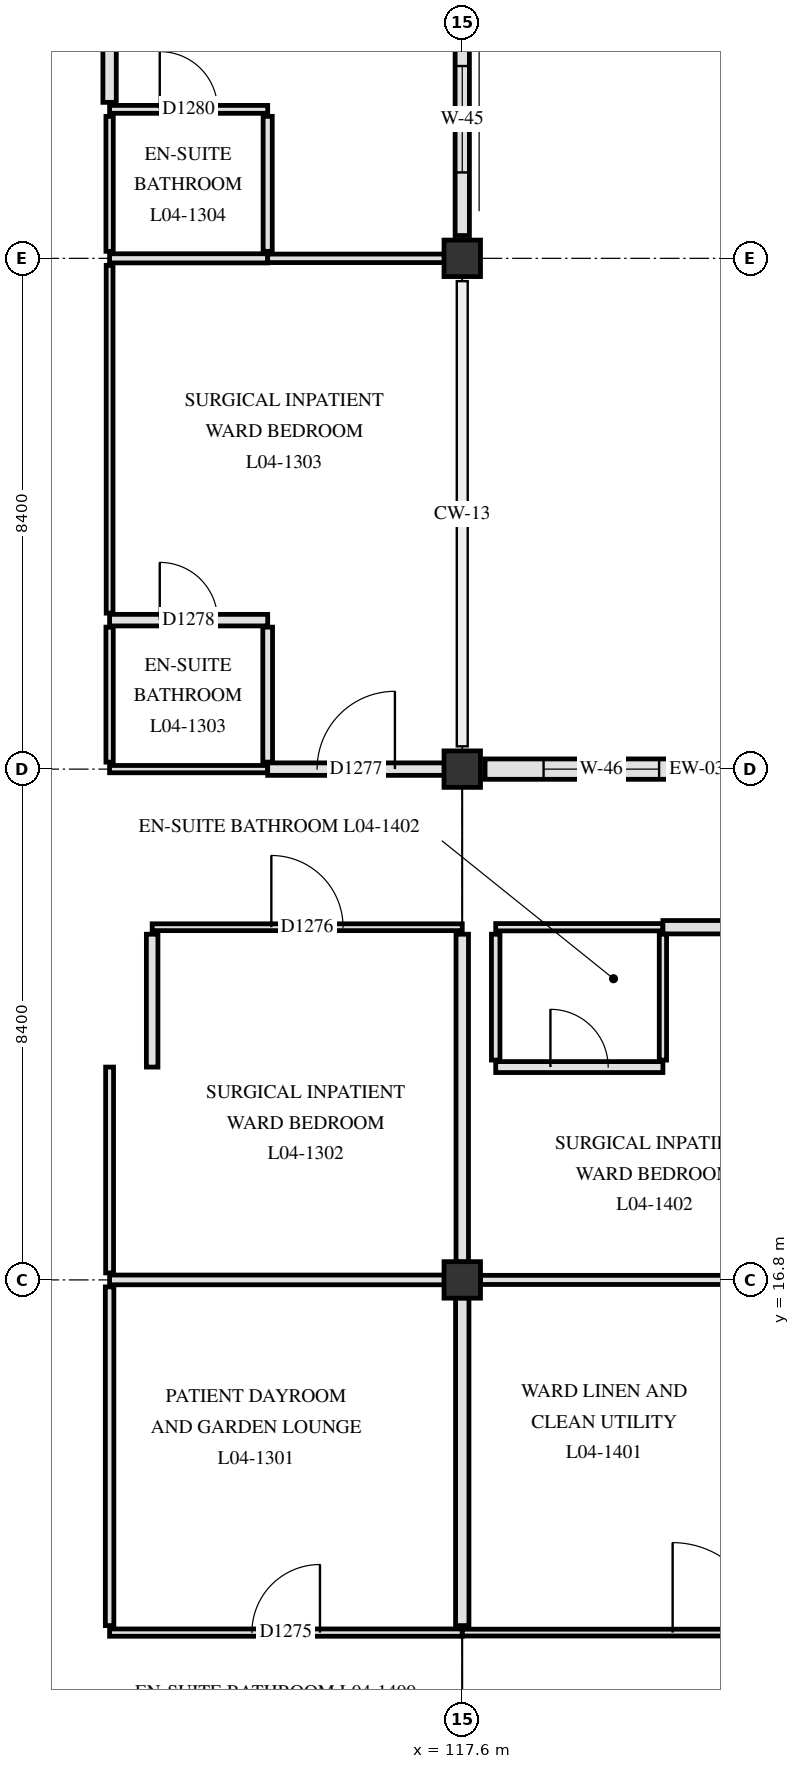
"""IFC4 building model, lengths in metres.
Left out: names, types, materials, properties, quantities, classifications, styles, units other than length and angle.
Written with IfcOpenShell. Run it as: python <this file> out.ifc"""

import sys

from ifc_helpers import new_model, si_unit, direction, frame, frame_2d, origin, origin_2d, place, context, subcontext, project, spatial, rectangle, extrude, element, fill, save


model = new_model("IFC4")
c1 = context("Model", 3, precision=1e-05, world=origin(), true_north=direction((0.0, 1.0)))
c2 = subcontext(c1, "Body", "Model", "MODEL_VIEW")
j1 = project(units=[si_unit("LENGTHUNIT", "METRE"), si_unit("PLANEANGLEUNIT", "RADIAN")], contexts=[c1])
p1 = place(None, origin())
s1 = spatial("IfcSite", under=j1, at=p1, CompositionType="ELEMENT")
p2 = place(p1, origin())
s2 = spatial("IfcBuilding", under=s1, at=p2, CompositionType="ELEMENT")
p3 = place(p2, frame((0.0, 0.0, 18.6)))
s3 = spatial("IfcBuildingStorey", under=s2, at=p3, CompositionType="ELEMENT", Elevation=18.6)
for number, where, z_axis, x_axis in (
    (1, (117.6, 16.8, 0.0), (0.0, 0.0, 1.0), (1.0, 0.0, 0.0)),
    (2, (117.6, 25.2, 0.0), (0.0, 0.0, 1.0), (1.0, 0.0, 0.0)),
    (3, (117.6, 33.6, 0.0), (0.0, 0.0, 1.0), (1.0, 0.0, 0.0)),
):
    element("IfcColumn", number, at=place(p3, frame(where, z_axis=z_axis, x_axis=x_axis)), inside=s3, PredefinedType="COLUMN", context=c2, shape_type="SweptSolid", body=[
        extrude(rectangle(XDim=0.6, YDim=0.6, at=origin_2d()), origin(), (0.0, 0.0, 1.0), 3.9),
    ])
p4 = place(p3, frame((117.6, 41.625, 0.0), z_axis=(0.0, 0.0, 1.0), x_axis=(0.0, -1.0, 0.0)))
e4 = element("IfcWall", 4, at=p4, inside=s3, PredefinedType="SOLIDWALL", context=c2, shape_type="SweptSolid", body=[
    extrude(rectangle(XDim=7.65, YDim=0.235, at=frame_2d((3.825, 0.0))), origin(), (0.0, 0.0, 1.0), 3.38),
])
p5 = place(p4, frame((1.113, 0.0, 0.85)))
e5 = element("IfcOpeningElement", 5, at=p5, cuts=e4, PredefinedType="OPENING", context=c2, shape_type="SweptSolid", body=[
    extrude(rectangle(XDim=1.6, YDim=1.78, at=frame_2d((0.8, 0.89))), frame((0.0, 0.127, 0.0), z_axis=(0.0, -1.0, 0.0), x_axis=(1.0, 0.0, 0.0)), (0.0, 0.0, 1.0), 0.255),
])
p6 = place(p4, frame((4.863, 0.0, 0.85)))
e6 = element("IfcOpeningElement", 6, at=p6, cuts=e4, PredefinedType="OPENING", context=c2, shape_type="SweptSolid", body=[
    extrude(rectangle(XDim=1.75, YDim=1.78, at=frame_2d((0.875, 0.89))), frame((0.0, 0.127, 0.0), z_axis=(0.0, -1.0, 0.0), x_axis=(1.0, 0.0, 0.0)), (0.0, 0.0, 1.0), 0.255),
])
p7 = place(p3, frame((117.975, 25.2, 0.0), z_axis=(0.0, 0.0, 1.0), x_axis=(1.0, 0.0, 0.0)))
e7 = element("IfcWall", 7, at=p7, inside=s3, PredefinedType="SOLIDWALL", context=c2, shape_type="SweptSolid", body=[
    extrude(rectangle(XDim=7.65, YDim=0.335, at=frame_2d((3.825, 0.0))), origin(), (0.0, 0.0, 1.0), 3.31),
])
p8 = place(p7, frame((0.962, 0.0, 0.85)))
e8 = element("IfcOpeningElement", 8, at=p8, cuts=e7, PredefinedType="OPENING", context=c2, shape_type="SweptSolid", body=[
    extrude(rectangle(XDim=1.9, YDim=1.78, at=frame_2d((0.95, 0.89))), frame((0.0, 0.177, 0.0), z_axis=(0.0, -1.0, 0.0), x_axis=(1.0, 0.0, 0.0)), (0.0, 0.0, 1.0), 0.355),
])
p9 = place(p7, frame((5.262, 0.0, 0.85)))
e9 = element("IfcOpeningElement", 9, at=p9, cuts=e7, PredefinedType="OPENING", context=c2, shape_type="SweptSolid", body=[
    extrude(rectangle(XDim=0.95, YDim=1.3, at=frame_2d((0.475, 0.65))), frame((0.0, 0.177, 0.0), z_axis=(0.0, -1.0, 0.0), x_axis=(1.0, 0.0, 0.0)), (0.0, 0.0, 1.0), 0.355),
])
p10 = place(p3, frame((111.8, 11.0, 0.0), z_axis=(0.0, 0.0, 1.0), x_axis=(1.0, 0.0, 0.0)))
e10 = element("IfcWall", 10, at=p10, inside=s3, PredefinedType="PARTITIONING", context=c2, shape_type="SweptSolid", body=[
    extrude(rectangle(XDim=5.8, YDim=0.12, at=frame_2d((2.9, 0.0))), origin(), (0.0, 0.0, 1.0), 3.26),
])
p11 = place(p10, frame((2.34, 0.0, 0.0)))
e11 = element("IfcOpeningElement", 11, at=p11, cuts=e10, PredefinedType="OPENING", context=c2, shape_type="SweptSolid", body=[
    extrude(rectangle(XDim=1.12, YDim=2.18, at=frame_2d((0.56, 1.09))), frame((0.0, 0.07, 0.0), z_axis=(0.0, -1.0, 0.0), x_axis=(1.0, 0.0, 0.0)), (0.0, 0.0, 1.0), 0.14),
])
p12 = place(p3, frame((117.6, 11.0, 0.0), z_axis=(0.0, 0.0, 1.0), x_axis=(1.0, 0.0, 0.0)))
e12 = element("IfcWall", 12, at=p12, inside=s3, PredefinedType="PARTITIONING", context=c2, shape_type="SweptSolid", body=[
    extrude(rectangle(XDim=8.4, YDim=0.112, at=frame_2d((4.2, 0.0))), origin(), (0.0, 0.0, 1.0), 3.26),
])
p13 = place(p12, frame((3.46, 0.0, 0.0)))
e13 = element("IfcOpeningElement", 13, at=p13, cuts=e12, PredefinedType="OPENING", context=c2, shape_type="SweptSolid", body=[
    extrude(rectangle(XDim=1.48, YDim=2.22, at=frame_2d((0.74, 1.11))), frame((0.0, 0.066, 0.0), z_axis=(0.0, -1.0, 0.0), x_axis=(1.0, 0.0, 0.0)), (0.0, 0.0, 1.0), 0.132),
])
p14 = place(p3, frame((111.8, 16.8, 0.0), z_axis=(0.0, 0.0, 1.0), x_axis=(1.0, 0.0, 0.0)))
e14 = element("IfcWall", 14, at=p14, inside=s3, PredefinedType="PARTITIONING", context=c2, shape_type="SweptSolid", body=[
    extrude(rectangle(XDim=5.505, YDim=0.16, at=frame_2d((2.752, 0.0))), origin(), (0.0, 0.0, 1.0), 3.16),
])
p15 = place(p3, frame((117.895, 16.8, 0.0), z_axis=(0.0, 0.0, 1.0), x_axis=(1.0, 0.0, 0.0)))
e15 = element("IfcWall", 15, at=p15, inside=s3, PredefinedType="PARTITIONING", context=c2, shape_type="SweptSolid", body=[
    extrude(rectangle(XDim=7.81, YDim=0.15, at=frame_2d((3.905, 0.0))), origin(), (0.0, 0.0, 1.0), 3.16),
])
p16 = place(p3, frame((118.15, 20.3, 0.0), z_axis=(0.0, 0.0, 1.0), x_axis=(1.0, 0.0, 0.0)))
e16 = element("IfcWall", 16, at=p16, inside=s3, PredefinedType="PARTITIONING", context=c2, shape_type="SweptSolid", body=[
    extrude(rectangle(XDim=2.75, YDim=0.18, at=frame_2d((1.375, 0.0))), origin(), (0.0, 0.0, 1.0), 3.61),
])
p17 = place(p16, frame((0.9, 0.0, 0.0)))
e17 = element("IfcOpeningElement", 17, at=p17, cuts=e16, PredefinedType="OPENING", context=c2, shape_type="SweptSolid", body=[
    extrude(rectangle(XDim=0.95, YDim=2.1, at=frame_2d((0.475, 1.05))), frame((0.0, 0.1, 0.0), z_axis=(0.0, -1.0, 0.0), x_axis=(1.0, 0.0, 0.0)), (0.0, 0.0, 1.0), 0.2),
])
p18 = place(p3, frame((112.5, 22.6, 0.0), z_axis=(0.0, 0.0, 1.0), x_axis=(1.0, 0.0, 0.0)))
e18 = element("IfcWall", 18, at=p18, inside=s3, PredefinedType="PARTITIONING", context=c2, shape_type="SweptSolid", body=[
    extrude(rectangle(XDim=5.1, YDim=0.112, at=frame_2d((2.55, 0.0))), origin(), (0.0, 0.0, 1.0), 3.26),
])
p19 = place(p18, frame((1.96, 0.0, 0.0)))
e19 = element("IfcOpeningElement", 19, at=p19, cuts=e18, PredefinedType="OPENING", context=c2, shape_type="SweptSolid", body=[
    extrude(rectangle(XDim=1.18, YDim=2.18, at=frame_2d((0.59, 1.09))), frame((0.0, 0.066, 0.0), z_axis=(0.0, -1.0, 0.0), x_axis=(1.0, 0.0, 0.0)), (0.0, 0.0, 1.0), 0.132),
])
p20 = place(p3, frame((118.15, 22.6, 0.0), z_axis=(0.0, 0.0, 1.0), x_axis=(1.0, 0.0, 0.0)))
e20 = element("IfcWall", 20, at=p20, inside=s3, PredefinedType="PARTITIONING", context=c2, shape_type="SweptSolid", body=[
    extrude(rectangle(XDim=2.75, YDim=0.12, at=frame_2d((1.375, 0.0))), origin(), (0.0, 0.0, 1.0), 3.61),
])
p21 = place(p3, frame((120.9, 22.6, 0.0), z_axis=(0.0, 0.0, 1.0), x_axis=(1.0, 0.0, 0.0)))
e21 = element("IfcWall", 21, at=p21, inside=s3, PredefinedType="PARTITIONING", context=c2, shape_type="SweptSolid", body=[
    extrude(rectangle(XDim=5.1, YDim=0.22, at=frame_2d((2.55, 0.0))), origin(), (0.0, 0.0, 1.0), 3.26),
])
p22 = place(p21, frame((1.78, 0.0, 0.0)))
e22 = element("IfcOpeningElement", 22, at=p22, cuts=e21, PredefinedType="OPENING", context=c2, shape_type="SweptSolid", body=[
    extrude(rectangle(XDim=1.54, YDim=2.24, at=frame_2d((0.77, 1.12))), frame((0.0, 0.12, 0.0), z_axis=(0.0, -1.0, 0.0), x_axis=(1.0, 0.0, 0.0)), (0.0, 0.0, 1.0), 0.24),
])
p23 = place(p3, frame((111.8, 25.2, 0.0), z_axis=(0.0, 0.0, 1.0), x_axis=(1.0, 0.0, 0.0)))
e23 = element("IfcWall", 23, at=p23, inside=s3, PredefinedType="PARTITIONING", context=c2, shape_type="SweptSolid", body=[
    extrude(rectangle(XDim=2.6, YDim=0.12, at=frame_2d((1.3, 0.0))), origin(), (0.0, 0.0, 1.0), 3.16),
])
p24 = place(p3, frame((114.4, 25.2, 0.0), z_axis=(0.0, 0.0, 1.0), x_axis=(1.0, 0.0, 0.0)))
e24 = element("IfcWall", 24, at=p24, inside=s3, PredefinedType="PARTITIONING", context=c2, shape_type="SweptSolid", body=[
    extrude(rectangle(XDim=2.905, YDim=0.205, at=frame_2d((1.453, 0.0))), origin(), (0.0, 0.0, 1.0), 3.16),
])
p25 = place(p24, frame((0.812, 0.0, 0.0)))
e25 = element("IfcOpeningElement", 25, at=p25, cuts=e24, PredefinedType="OPENING", context=c2, shape_type="SweptSolid", body=[
    extrude(rectangle(XDim=1.28, YDim=2.18, at=frame_2d((0.64, 1.09))), frame((0.0, 0.113, 0.0), z_axis=(0.0, -1.0, 0.0), x_axis=(1.0, 0.0, 0.0)), (0.0, 0.0, 1.0), 0.225),
])
p26 = place(p3, frame((111.8, 27.65, 0.0), z_axis=(0.0, 0.0, 1.0), x_axis=(1.0, 0.0, 0.0)))
e26 = element("IfcWall", 26, at=p26, inside=s3, PredefinedType="PARTITIONING", context=c2, shape_type="SweptSolid", body=[
    extrude(rectangle(XDim=2.6, YDim=0.19, at=frame_2d((1.3, 0.0))), origin(), (0.0, 0.0, 1.0), 3.61),
])
p27 = place(p26, frame((0.825, 0.0, 0.0)))
e27 = element("IfcOpeningElement", 27, at=p27, cuts=e26, PredefinedType="OPENING", context=c2, shape_type="SweptSolid", body=[
    extrude(rectangle(XDim=0.95, YDim=2.1, at=frame_2d((0.475, 1.05))), frame((0.0, 0.105, 0.0), z_axis=(0.0, -1.0, 0.0), x_axis=(1.0, 0.0, 0.0)), (0.0, 0.0, 1.0), 0.21),
])
p28 = place(p3, frame((111.8, 33.6, 0.0), z_axis=(0.0, 0.0, 1.0), x_axis=(1.0, 0.0, 0.0)))
e28 = element("IfcWall", 28, at=p28, inside=s3, PredefinedType="PARTITIONING", context=c2, shape_type="SweptSolid", body=[
    extrude(rectangle(XDim=2.6, YDim=0.15, at=frame_2d((1.3, 0.0))), origin(), (0.0, 0.0, 1.0), 3.16),
])
p29 = place(p3, frame((114.4, 33.6, 0.0), z_axis=(0.0, 0.0, 1.0), x_axis=(1.0, 0.0, 0.0)))
e29 = element("IfcWall", 29, at=p29, inside=s3, PredefinedType="PARTITIONING", context=c2, shape_type="SweptSolid", body=[
    extrude(rectangle(XDim=2.905, YDim=0.14, at=frame_2d((1.453, 0.0))), origin(), (0.0, 0.0, 1.0), 3.16),
])
p30 = place(p3, frame((111.8, 36.05, 0.0), z_axis=(0.0, 0.0, 1.0), x_axis=(1.0, 0.0, 0.0)))
e30 = element("IfcWall", 30, at=p30, inside=s3, PredefinedType="PARTITIONING", context=c2, shape_type="SweptSolid", body=[
    extrude(rectangle(XDim=2.6, YDim=0.13, at=frame_2d((1.3, 0.0))), origin(), (0.0, 0.0, 1.0), 3.61),
])
p31 = place(p30, frame((0.825, 0.0, 0.0)))
e31 = element("IfcOpeningElement", 31, at=p31, cuts=e30, PredefinedType="OPENING", context=c2, shape_type="SweptSolid", body=[
    extrude(rectangle(XDim=0.95, YDim=2.1, at=frame_2d((0.475, 1.05))), frame((0.0, 0.075, 0.0), z_axis=(0.0, -1.0, 0.0), x_axis=(1.0, 0.0, 0.0)), (0.0, 0.0, 1.0), 0.15),
])
p32 = place(p3, frame((111.8, 11.115, 0.0), z_axis=(0.0, 0.0, 1.0), x_axis=(0.0, 1.0, 0.0)))
e32 = element("IfcWall", 32, at=p32, inside=s3, PredefinedType="PARTITIONING", context=c2, shape_type="SweptSolid", body=[
    extrude(rectangle(XDim=5.57, YDim=0.14, at=frame_2d((2.785, 0.0))), origin(), (0.0, 0.0, 1.0), 3.31),
])
p33 = place(p3, frame((111.8, 16.915, 0.0), z_axis=(0.0, 0.0, 1.0), x_axis=(0.0, 1.0, 0.0)))
e33 = element("IfcWall", 33, at=p33, inside=s3, PredefinedType="PARTITIONING", context=c2, shape_type="SweptSolid", body=[
    extrude(rectangle(XDim=3.385, YDim=0.13, at=frame_2d((1.692, 0.0))), origin(), (0.0, 0.0, 1.0), 3.31),
])
p34 = place(p3, frame((111.8, 25.315, 0.0), z_axis=(0.0, 0.0, 1.0), x_axis=(0.0, 1.0, 0.0)))
e34 = element("IfcWall", 34, at=p34, inside=s3, PredefinedType="PARTITIONING", context=c2, shape_type="SweptSolid", body=[
    extrude(rectangle(XDim=2.22, YDim=0.12, at=frame_2d((1.11, 0.0))), origin(), (0.0, 0.0, 1.0), 3.61),
])
p35 = place(p3, frame((111.8, 27.765, 0.0), z_axis=(0.0, 0.0, 1.0), x_axis=(0.0, 1.0, 0.0)))
e35 = element("IfcWall", 35, at=p35, inside=s3, PredefinedType="PARTITIONING", context=c2, shape_type="SweptSolid", body=[
    extrude(rectangle(XDim=5.72, YDim=0.112, at=frame_2d((2.86, 0.0))), origin(), (0.0, 0.0, 1.0), 3.31),
])
p36 = place(p3, frame((111.8, 33.715, 0.0), z_axis=(0.0, 0.0, 1.0), x_axis=(0.0, 1.0, 0.0)))
e36 = element("IfcWall", 36, at=p36, inside=s3, PredefinedType="PARTITIONING", context=c2, shape_type="SweptSolid", body=[
    extrude(rectangle(XDim=2.22, YDim=0.12, at=frame_2d((1.11, 0.0))), origin(), (0.0, 0.0, 1.0), 3.61),
])
p37 = place(p3, frame((111.8, 36.165, 0.0), z_axis=(0.0, 0.0, 1.0), x_axis=(0.0, 1.0, 0.0)))
e37 = element("IfcWall", 37, at=p37, inside=s3, PredefinedType="PARTITIONING", context=c2, shape_type="SweptSolid", body=[
    extrude(rectangle(XDim=5.72, YDim=0.22, at=frame_2d((2.86, 0.0))), origin(), (0.0, 0.0, 1.0), 3.31),
])
p38 = place(p3, frame((112.5, 20.3, 0.0), z_axis=(0.0, 0.0, 1.0), x_axis=(0.0, 1.0, 0.0)))
e38 = element("IfcWall", 38, at=p38, inside=s3, PredefinedType="PARTITIONING", context=c2, shape_type="SweptSolid", body=[
    extrude(rectangle(XDim=2.185, YDim=0.19, at=frame_2d((1.093, 0.0))), origin(), (0.0, 0.0, 1.0), 3.31),
])
p39 = place(p3, frame((114.4, 25.315, 0.0), z_axis=(0.0, 0.0, 1.0), x_axis=(0.0, 1.0, 0.0)))
e39 = element("IfcWall", 39, at=p39, inside=s3, PredefinedType="PARTITIONING", context=c2, shape_type="SweptSolid", body=[
    extrude(rectangle(XDim=2.22, YDim=0.16, at=frame_2d((1.11, 0.0))), origin(), (0.0, 0.0, 1.0), 3.61),
])
p40 = place(p3, frame((114.4, 33.715, 0.0), z_axis=(0.0, 0.0, 1.0), x_axis=(0.0, 1.0, 0.0)))
e40 = element("IfcWall", 40, at=p40, inside=s3, PredefinedType="PARTITIONING", context=c2, shape_type="SweptSolid", body=[
    extrude(rectangle(XDim=2.22, YDim=0.15, at=frame_2d((1.11, 0.0))), origin(), (0.0, 0.0, 1.0), 3.61),
])
p41 = place(p3, frame((117.6, 11.115, 0.0), z_axis=(0.0, 0.0, 1.0), x_axis=(0.0, 1.0, 0.0)))
e41 = element("IfcWall", 41, at=p41, inside=s3, PredefinedType="PARTITIONING", context=c2, shape_type="SweptSolid", body=[
    extrude(rectangle(XDim=5.39, YDim=0.22, at=frame_2d((2.695, 0.0))), origin(), (0.0, 0.0, 1.0), 3.26),
])
p42 = place(p3, frame((117.6, 17.095, 0.0), z_axis=(0.0, 0.0, 1.0), x_axis=(0.0, 1.0, 0.0)))
e42 = element("IfcWall", 42, at=p42, inside=s3, PredefinedType="PARTITIONING", context=c2, shape_type="SweptSolid", body=[
    extrude(rectangle(XDim=5.39, YDim=0.205, at=frame_2d((2.695, 0.0))), origin(), (0.0, 0.0, 1.0), 3.26),
])
p43 = place(p3, frame((118.15, 20.415, 0.0), z_axis=(0.0, 0.0, 1.0), x_axis=(0.0, 1.0, 0.0)))
e43 = element("IfcWall", 43, at=p43, inside=s3, PredefinedType="PARTITIONING", context=c2, shape_type="SweptSolid", body=[
    extrude(rectangle(XDim=2.07, YDim=0.14, at=frame_2d((1.035, 0.0))), origin(), (0.0, 0.0, 1.0), 3.31),
])
p44 = place(p3, frame((120.9, 20.415, 0.0), z_axis=(0.0, 0.0, 1.0), x_axis=(0.0, 1.0, 0.0)))
e44 = element("IfcWall", 44, at=p44, inside=s3, PredefinedType="PARTITIONING", context=c2, shape_type="SweptSolid", body=[
    extrude(rectangle(XDim=2.07, YDim=0.12, at=frame_2d((1.035, 0.0))), origin(), (0.0, 0.0, 1.0), 3.31),
])
p45 = place(p6, origin())
e45 = element("IfcWindow", 45, at=p45, inside=s3, PartitioningType="SINGLE_PANEL", PredefinedType="WINDOW", context=c2, shape_type="SweptSolid", body=[
    extrude(rectangle(XDim=1.75, YDim=1.78, at=frame_2d((0.875, 0.89))), frame((0.0, 0.03, 0.0), z_axis=(0.0, -1.0, 0.0), x_axis=(1.0, 0.0, 0.0)), (0.0, 0.0, 1.0), 0.06),
])
fill(e6, e45)
p46 = place(p8, origin())
e46 = element("IfcWindow", 46, at=p46, inside=s3, PartitioningType="SINGLE_PANEL", PredefinedType="WINDOW", context=c2, shape_type="SweptSolid", body=[
    extrude(rectangle(XDim=1.9, YDim=1.78, at=frame_2d((0.95, 0.89))), frame((0.0, 0.03, 0.0), z_axis=(0.0, -1.0, 0.0), x_axis=(1.0, 0.0, 0.0)), (0.0, 0.0, 1.0), 0.06),
])
fill(e8, e46)
p47 = place(p11, origin())
e47 = element("IfcDoor", 47, at=p47, inside=s3, OperationType="SINGLE_SWING_RIGHT", PredefinedType="DOOR", context=c2, shape_type="SweptSolid", body=[
    extrude(rectangle(XDim=1.12, YDim=2.18, at=frame_2d((0.56, 1.09))), frame((0.0, 0.025, 0.0), z_axis=(0.0, -1.0, 0.0), x_axis=(1.0, 0.0, 0.0)), (0.0, 0.0, 1.0), 0.05),
])
fill(e11, e47)
p48 = place(p19, origin())
e48 = element("IfcDoor", 48, at=p48, inside=s3, OperationType="SINGLE_SWING_LEFT", PredefinedType="DOOR", context=c2, shape_type="SweptSolid", body=[
    extrude(rectangle(XDim=1.18, YDim=2.18, at=frame_2d((0.59, 1.09))), frame((0.0, 0.025, 0.0), z_axis=(0.0, -1.0, 0.0), x_axis=(1.0, 0.0, 0.0)), (0.0, 0.0, 1.0), 0.05),
])
fill(e19, e48)
p49 = place(p25, origin())
e49 = element("IfcDoor", 49, at=p49, inside=s3, OperationType="SINGLE_SWING_RIGHT", PredefinedType="DOOR", context=c2, shape_type="SweptSolid", body=[
    extrude(rectangle(XDim=1.28, YDim=2.18, at=frame_2d((0.64, 1.09))), frame((0.0, 0.025, 0.0), z_axis=(0.0, -1.0, 0.0), x_axis=(1.0, 0.0, 0.0)), (0.0, 0.0, 1.0), 0.05),
])
fill(e25, e49)
p50 = place(p27, origin())
e50 = element("IfcDoor", 50, at=p50, inside=s3, OperationType="SINGLE_SWING_LEFT", PredefinedType="DOOR", context=c2, shape_type="SweptSolid", body=[
    extrude(rectangle(XDim=0.95, YDim=2.1, at=frame_2d((0.475, 1.05))), frame((0.0, 0.025, 0.0), z_axis=(0.0, -1.0, 0.0), x_axis=(1.0, 0.0, 0.0)), (0.0, 0.0, 1.0), 0.05),
])
fill(e27, e50)
p51 = place(p31, origin())
e51 = element("IfcDoor", 51, at=p51, inside=s3, OperationType="SINGLE_SWING_LEFT", PredefinedType="DOOR", context=c2, shape_type="SweptSolid", body=[
    extrude(rectangle(XDim=0.95, YDim=2.1, at=frame_2d((0.475, 1.05))), frame((0.0, 0.025, 0.0), z_axis=(0.0, -1.0, 0.0), x_axis=(1.0, 0.0, 0.0)), (0.0, 0.0, 1.0), 0.05),
])
fill(e31, e51)
p52 = place(p13, origin())
e52 = element("IfcDoor", 52, at=p52, inside=s3, OperationType="SINGLE_SWING_LEFT", PredefinedType="DOOR", context=c2, shape_type="SweptSolid", body=[
    extrude(rectangle(XDim=1.48, YDim=2.22, at=frame_2d((0.74, 1.11))), frame((0.0, 0.025, 0.0), z_axis=(0.0, -1.0, 0.0), x_axis=(1.0, 0.0, 0.0)), (0.0, 0.0, 1.0), 0.05),
])
fill(e13, e52)
p53 = place(p17, origin())
e53 = element("IfcDoor", 53, at=p53, inside=s3, OperationType="SINGLE_SWING_LEFT", PredefinedType="DOOR", context=c2, shape_type="SweptSolid", body=[
    extrude(rectangle(XDim=0.95, YDim=2.1, at=frame_2d((0.475, 1.05))), frame((0.0, 0.025, 0.0), z_axis=(0.0, -1.0, 0.0), x_axis=(1.0, 0.0, 0.0)), (0.0, 0.0, 1.0), 0.05),
])
fill(e17, e53)
save(model, sys.argv[1])
